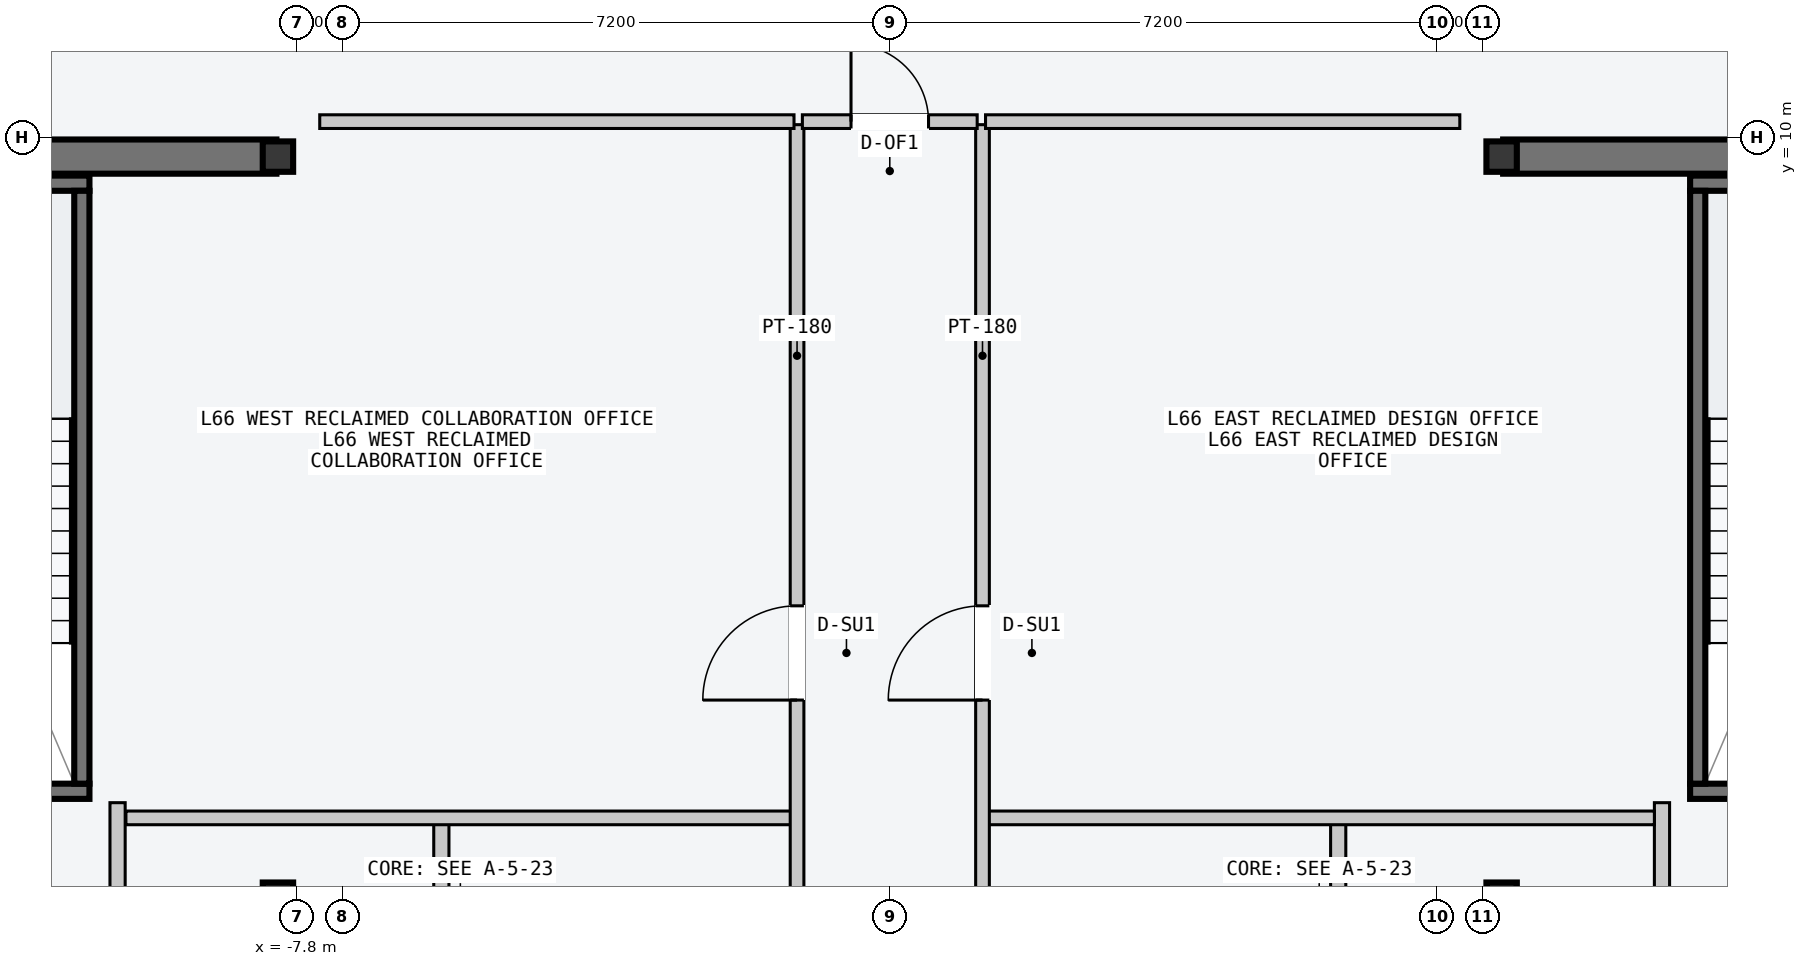
"""IFC4 building model, lengths in metres.
Left out: names, types, materials, properties, quantities, classifications, styles, units other than length and angle.
Written with IfcOpenShell. Run it as: python <this file> out.ifc"""

import sys

from ifc_helpers import new_model, si_unit, direction, frame, frame_2d, origin, origin_2d, place, context, subcontext, project, spatial, rectangle, i_section, extrude, element, fill, save


model = new_model("IFC4")
c1 = context("Model", 3, precision=1e-05, world=origin(), true_north=direction((0.0, 1.0)))
c2 = subcontext(c1, "Body", "Model", "MODEL_VIEW")
j1 = project(units=[si_unit("LENGTHUNIT", "METRE"), si_unit("PLANEANGLEUNIT", "RADIAN")], contexts=[c1])
p1 = place(None, origin())
s1 = spatial("IfcSite", under=j1, at=p1, CompositionType="ELEMENT")
p2 = place(p1, origin())
s2 = spatial("IfcBuilding", under=s1, at=p2, CompositionType="ELEMENT")
p3 = place(p2, frame((0.0, 0.0, 250.8)))
s3 = spatial("IfcBuildingStorey", under=s2, at=p3, CompositionType="ELEMENT", Elevation=250.8)
for number, where, z_axis, x_axis in (
    (1, (-14.53, 9.75, -0.2), (0.0, 0.0, 1.0), (1.0, 0.0, 0.0)),
    (2, (8.07, 9.75, -0.2), (0.0, 0.0, 1.0), (1.0, 0.0, 0.0)),
):
    element("IfcWall", number, at=place(p3, frame(where, z_axis=z_axis, x_axis=x_axis)), inside=s3, PredefinedType="SHEAR", context=c2, shape_type="SweptSolid", body=[
        extrude(rectangle(XDim=6.46, YDim=0.45, at=frame_2d((3.23, 0.0))), origin(), (0.0, 0.0, 1.0), 3.6),
    ])
p4 = place(p3, frame((-14.25, 1.4, -0.2), z_axis=(0.0, 0.0, 1.0), x_axis=(1.0, 0.0, 0.0)))
e3 = element("IfcWall", 3, at=p4, inside=s3, PredefinedType="SOLIDWALL", context=c2, shape_type="SweptSolid", body=[
    extrude(rectangle(XDim=3.72, YDim=0.2, at=frame_2d((1.86, 0.0))), origin(), (0.0, 0.0, 1.0), 3.6),
])
p5 = place(p4, frame((1.5, 0.0, 0.2)))
e4 = element("IfcOpeningElement", 4, at=p5, cuts=e3, PredefinedType="OPENING", context=c2, shape_type="SweptSolid", body=[
    extrude(rectangle(XDim=1.12, YDim=2.18, at=frame_2d((0.56, 1.09))), frame((0.0, 0.11, 0.0), z_axis=(0.0, -1.0, 0.0), x_axis=(1.0, 0.0, 0.0)), (0.0, 0.0, 1.0), 0.22),
])
p6 = place(p3, frame((-14.25, 9.4, -0.2), z_axis=(0.0, 0.0, 1.0), x_axis=(1.0, 0.0, 0.0)))
e5 = element("IfcWall", 5, at=p6, inside=s3, PredefinedType="SOLIDWALL", context=c2, shape_type="SweptSolid", body=[
    extrude(rectangle(XDim=3.72, YDim=0.2, at=frame_2d((1.86, 0.0))), origin(), (0.0, 0.0, 1.0), 3.6),
])
p7 = place(p3, frame((-10.63, 1.5, -0.2), z_axis=(0.0, 0.0, 1.0), x_axis=(0.0, 1.0, 0.0)))
e6 = element("IfcWall", 6, at=p7, inside=s3, PredefinedType="SOLIDWALL", context=c2, shape_type="SweptSolid", body=[
    extrude(rectangle(XDim=7.8, YDim=0.2, at=frame_2d((3.9, 0.0))), origin(), (0.0, 0.0, 1.0), 3.6),
])
p8 = place(p3, frame((10.53, 1.4, -0.2), z_axis=(0.0, 0.0, 1.0), x_axis=(1.0, 0.0, 0.0)))
e7 = element("IfcWall", 7, at=p8, inside=s3, PredefinedType="SOLIDWALL", context=c2, shape_type="SweptSolid", body=[
    extrude(rectangle(XDim=3.72, YDim=0.2, at=frame_2d((1.86, 0.0))), origin(), (0.0, 0.0, 1.0), 3.6),
])
p9 = place(p8, frame((1.5, 0.0, 0.2)))
e8 = element("IfcOpeningElement", 8, at=p9, cuts=e7, PredefinedType="OPENING", context=c2, shape_type="SweptSolid", body=[
    extrude(rectangle(XDim=1.12, YDim=2.18, at=frame_2d((0.56, 1.09))), frame((0.0, 0.11, 0.0), z_axis=(0.0, -1.0, 0.0), x_axis=(1.0, 0.0, 0.0)), (0.0, 0.0, 1.0), 0.22),
])
p10 = place(p3, frame((10.53, 9.4, -0.2), z_axis=(0.0, 0.0, 1.0), x_axis=(1.0, 0.0, 0.0)))
e9 = element("IfcWall", 9, at=p10, inside=s3, PredefinedType="SOLIDWALL", context=c2, shape_type="SweptSolid", body=[
    extrude(rectangle(XDim=3.72, YDim=0.2, at=frame_2d((1.86, 0.0))), origin(), (0.0, 0.0, 1.0), 3.6),
])
p11 = place(p3, frame((10.63, 1.5, -0.2), z_axis=(0.0, 0.0, 1.0), x_axis=(0.0, 1.0, 0.0)))
e10 = element("IfcWall", 10, at=p11, inside=s3, PredefinedType="SOLIDWALL", context=c2, shape_type="SweptSolid", body=[
    extrude(rectangle(XDim=7.8, YDim=0.2, at=frame_2d((3.9, 0.0))), origin(), (0.0, 0.0, 1.0), 3.6),
])
for number, where, z_axis, x_axis in (
    (11, (-8.05, 0.0, 0.0), (0.0, 0.0, 1.0), (1.0, 0.0, 0.0)),
    (12, (-8.05, 9.75, 0.0), (0.0, 0.0, 1.0), (1.0, 0.0, 0.0)),
    (13, (8.05, 0.0, 0.0), (0.0, 0.0, 1.0), (1.0, 0.0, 0.0)),
    (14, (8.05, 9.75, 0.0), (0.0, 0.0, 1.0), (1.0, 0.0, 0.0)),
):
    element("IfcColumn", number, at=place(p3, frame(where, z_axis=z_axis, x_axis=x_axis)), inside=s3, PredefinedType="COLUMN", context=c2, shape_type="SweptSolid", body=[
        extrude(i_section(OverallWidth=0.4, OverallDepth=0.4, WebThickness=0.013, FlangeThickness=0.021, at=origin_2d()), origin(), (0.0, 0.0, 1.0), 3.6),
    ])
p12 = place(p3, frame((-5.9, -9.45, 0.0), z_axis=(0.0, 0.0, 1.0), x_axis=(0.0, 1.0, 0.0)))
e15 = element("IfcWall", 15, at=p12, inside=s3, PredefinedType="PARTITIONING", context=c2, shape_type="SweptSolid", body=[
    extrude(rectangle(XDim=10.5, YDim=0.2, at=frame_2d((5.25, 0.0))), origin(), (0.0, 0.0, 1.0), 3.4),
])
p13 = place(p12, frame((3.9, 0.0, 0.0)))
e16 = element("IfcOpeningElement", 16, at=p13, cuts=e15, PredefinedType="OPENING", context=c2, shape_type="SweptSolid", body=[
    extrude(rectangle(XDim=1.5, YDim=2.2, at=frame_2d((0.75, 1.1))), frame((0.0, 0.11, 0.0), z_axis=(0.0, -1.0, 0.0), x_axis=(1.0, 0.0, 0.0)), (0.0, 0.0, 1.0), 0.22),
])
p14 = place(p3, frame((-10.16, -2.55, 0.0), z_axis=(0.0, 0.0, 1.0), x_axis=(0.0, 1.0, 0.0)))
e17 = element("IfcWall", 17, at=p14, inside=s3, PredefinedType="PARTITIONING", context=c2, shape_type="SweptSolid", body=[
    extrude(rectangle(XDim=3.8, YDim=0.2, at=frame_2d((1.9, 0.0))), origin(), (0.0, 0.0, 1.0), 3.4),
])
p15 = place(p14, frame((1.3, 0.0, 0.0)))
e18 = element("IfcOpeningElement", 18, at=p15, cuts=e17, PredefinedType="OPENING", context=c2, shape_type="SweptSolid", body=[
    extrude(rectangle(XDim=1.1, YDim=2.15, at=frame_2d((0.55, 1.075))), frame((0.0, 0.11, 0.0), z_axis=(0.0, -1.0, 0.0), x_axis=(1.0, 0.0, 0.0)), (0.0, 0.0, 1.0), 0.22),
])
p16 = place(p3, frame((5.9, -9.45, 0.0), z_axis=(0.0, 0.0, 1.0), x_axis=(0.0, 1.0, 0.0)))
e19 = element("IfcWall", 19, at=p16, inside=s3, PredefinedType="PARTITIONING", context=c2, shape_type="SweptSolid", body=[
    extrude(rectangle(XDim=10.5, YDim=0.2, at=frame_2d((5.25, 0.0))), origin(), (0.0, 0.0, 1.0), 3.4),
])
p17 = place(p16, frame((3.9, 0.0, 0.0)))
e20 = element("IfcOpeningElement", 20, at=p17, cuts=e19, PredefinedType="OPENING", context=c2, shape_type="SweptSolid", body=[
    extrude(rectangle(XDim=1.5, YDim=2.2, at=frame_2d((0.75, 1.1))), frame((0.0, 0.11, 0.0), z_axis=(0.0, -1.0, 0.0), x_axis=(1.0, 0.0, 0.0)), (0.0, 0.0, 1.0), 0.22),
])
p18 = place(p3, frame((10.16, -2.55, 0.0), z_axis=(0.0, 0.0, 1.0), x_axis=(0.0, 1.0, 0.0)))
e21 = element("IfcWall", 21, at=p18, inside=s3, PredefinedType="PARTITIONING", context=c2, shape_type="SweptSolid", body=[
    extrude(rectangle(XDim=3.8, YDim=0.2, at=frame_2d((1.9, 0.0))), origin(), (0.0, 0.0, 1.0), 3.4),
])
p19 = place(p18, frame((1.3, 0.0, 0.0)))
e22 = element("IfcOpeningElement", 22, at=p19, cuts=e21, PredefinedType="OPENING", context=c2, shape_type="SweptSolid", body=[
    extrude(rectangle(XDim=1.1, YDim=2.15, at=frame_2d((0.55, 1.075))), frame((0.0, 0.11, 0.0), z_axis=(0.0, -1.0, 0.0), x_axis=(1.0, 0.0, 0.0)), (0.0, 0.0, 1.0), 0.22),
])
p20 = place(p3, frame((-10.05, 1.05, 0.0), z_axis=(0.0, 0.0, 1.0), x_axis=(1.0, 0.0, 0.0)))
e23 = element("IfcWall", 23, at=p20, inside=s3, PredefinedType="PARTITIONING", context=c2, shape_type="SweptSolid", body=[
    extrude(rectangle(XDim=8.79, YDim=0.18, at=frame_2d((4.395, 0.0))), origin(), (0.0, 0.0, 1.0), 3.4),
])
p21 = place(p3, frame((-1.22, -3.5, 0.0), z_axis=(0.0, 0.0, 1.0), x_axis=(0.0, 1.0, 0.0)))
e24 = element("IfcWall", 24, at=p21, inside=s3, PredefinedType="PARTITIONING", context=c2, shape_type="SweptSolid", body=[
    extrude(rectangle(XDim=13.67, YDim=0.18, at=frame_2d((6.835, 0.0))), origin(), (0.0, 0.0, 1.0), 3.4),
])
p22 = place(p21, frame((6.1, 0.0, 0.0)))
e25 = element("IfcOpeningElement", 25, at=p22, cuts=e24, PredefinedType="OPENING", context=c2, shape_type="SweptSolid", body=[
    extrude(rectangle(XDim=1.24, YDim=2.24, at=frame_2d((0.62, 1.12))), frame((0.0, 0.1, 0.0), z_axis=(0.0, -1.0, 0.0), x_axis=(1.0, 0.0, 0.0)), (0.0, 0.0, 1.0), 0.2),
])
p23 = place(p21, frame((1.6, 0.0, 0.0)))
e26 = element("IfcOpeningElement", 26, at=p23, cuts=e24, PredefinedType="OPENING", context=c2, shape_type="SweptSolid", body=[
    extrude(rectangle(XDim=0.96, YDim=2.18, at=frame_2d((0.48, 1.09))), frame((0.0, 0.1, 0.0), z_axis=(0.0, -1.0, 0.0), x_axis=(1.0, 0.0, 0.0)), (0.0, 0.0, 1.0), 0.2),
])
p24 = place(p3, frame((-7.5, 10.21, 0.0), z_axis=(0.0, 0.0, 1.0), x_axis=(1.0, 0.0, 0.0)))
e27 = element("IfcWall", 27, at=p24, inside=s3, PredefinedType="PARTITIONING", context=c2, shape_type="SweptSolid", body=[
    extrude(rectangle(XDim=6.24, YDim=0.18, at=frame_2d((3.12, 0.0))), origin(), (0.0, 0.0, 1.0), 3.4),
])
p25 = place(p3, frame((1.26, 1.05, 0.0), z_axis=(0.0, 0.0, 1.0), x_axis=(1.0, 0.0, 0.0)))
e28 = element("IfcWall", 28, at=p25, inside=s3, PredefinedType="PARTITIONING", context=c2, shape_type="SweptSolid", body=[
    extrude(rectangle(XDim=8.8, YDim=0.18, at=frame_2d((4.4, 0.0))), origin(), (0.0, 0.0, 1.0), 3.4),
])
p26 = place(p3, frame((1.22, -3.5, 0.0), z_axis=(0.0, 0.0, 1.0), x_axis=(0.0, 1.0, 0.0)))
e29 = element("IfcWall", 29, at=p26, inside=s3, PredefinedType="PARTITIONING", context=c2, shape_type="SweptSolid", body=[
    extrude(rectangle(XDim=13.67, YDim=0.18, at=frame_2d((6.835, 0.0))), origin(), (0.0, 0.0, 1.0), 3.4),
])
p27 = place(p26, frame((6.1, 0.0, 0.0)))
e30 = element("IfcOpeningElement", 30, at=p27, cuts=e29, PredefinedType="OPENING", context=c2, shape_type="SweptSolid", body=[
    extrude(rectangle(XDim=1.24, YDim=2.24, at=frame_2d((0.62, 1.12))), frame((0.0, 0.1, 0.0), z_axis=(0.0, -1.0, 0.0), x_axis=(1.0, 0.0, 0.0)), (0.0, 0.0, 1.0), 0.2),
])
p28 = place(p26, frame((1.6, 0.0, 0.0)))
e31 = element("IfcOpeningElement", 31, at=p28, cuts=e29, PredefinedType="OPENING", context=c2, shape_type="SweptSolid", body=[
    extrude(rectangle(XDim=0.96, YDim=2.18, at=frame_2d((0.48, 1.09))), frame((0.0, 0.1, 0.0), z_axis=(0.0, -1.0, 0.0), x_axis=(1.0, 0.0, 0.0)), (0.0, 0.0, 1.0), 0.2),
])
p29 = place(p3, frame((1.26, 10.21, 0.0), z_axis=(0.0, 0.0, 1.0), x_axis=(1.0, 0.0, 0.0)))
e32 = element("IfcWall", 32, at=p29, inside=s3, PredefinedType="PARTITIONING", context=c2, shape_type="SweptSolid", body=[
    extrude(rectangle(XDim=6.24, YDim=0.18, at=frame_2d((3.12, 0.0))), origin(), (0.0, 0.0, 1.0), 3.4),
])
p30 = place(p3, frame((-1.15, 10.21, 0.0), z_axis=(0.0, 0.0, 1.0), x_axis=(1.0, 0.0, 0.0)))
e33 = element("IfcWall", 33, at=p30, inside=s3, PredefinedType="PARTITIONING", context=c2, shape_type="SweptSolid", body=[
    extrude(rectangle(XDim=2.3, YDim=0.18, at=frame_2d((1.15, 0.0))), origin(), (0.0, 0.0, 1.0), 3.4),
])
p31 = place(p30, frame((0.64, 0.0, 0.0)))
e34 = element("IfcOpeningElement", 34, at=p31, cuts=e33, PredefinedType="OPENING", context=c2, shape_type="SweptSolid", body=[
    extrude(rectangle(XDim=1.02, YDim=2.2, at=frame_2d((0.51, 1.1))), frame((0.0, 0.1, 0.0), z_axis=(0.0, -1.0, 0.0), x_axis=(1.0, 0.0, 0.0)), (0.0, 0.0, 1.0), 0.2),
])
p32 = place(p22, origin())
e35 = element("IfcDoor", 35, at=p32, inside=s3, OperationType="SINGLE_SWING_LEFT", PredefinedType="DOOR", context=c2, shape_type="SweptSolid", body=[
    extrude(rectangle(XDim=1.24, YDim=2.24, at=frame_2d((0.62, 1.12))), frame((0.0, 0.025, 0.0), z_axis=(0.0, -1.0, 0.0), x_axis=(1.0, 0.0, 0.0)), (0.0, 0.0, 1.0), 0.05),
])
fill(e25, e35)
p33 = place(p27, origin())
e36 = element("IfcDoor", 36, at=p33, inside=s3, OperationType="SINGLE_SWING_LEFT", PredefinedType="DOOR", context=c2, shape_type="SweptSolid", body=[
    extrude(rectangle(XDim=1.24, YDim=2.24, at=frame_2d((0.62, 1.12))), frame((0.0, 0.025, 0.0), z_axis=(0.0, -1.0, 0.0), x_axis=(1.0, 0.0, 0.0)), (0.0, 0.0, 1.0), 0.05),
])
fill(e30, e36)
p34 = place(p31, origin())
e37 = element("IfcDoor", 37, at=p34, inside=s3, OperationType="SINGLE_SWING_LEFT", PredefinedType="DOOR", context=c2, shape_type="SweptSolid", body=[
    extrude(rectangle(XDim=1.02, YDim=2.2, at=frame_2d((0.51, 1.1))), frame((0.0, 0.025, 0.0), z_axis=(0.0, -1.0, 0.0), x_axis=(1.0, 0.0, 0.0)), (0.0, 0.0, 1.0), 0.05),
])
fill(e34, e37)
save(model, sys.argv[1])
